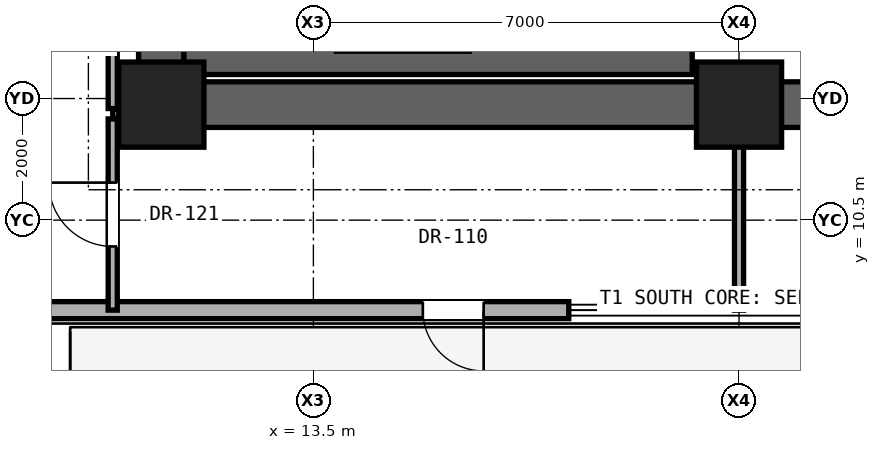
"""IFC4 building model, lengths in metres.
Left out: names, types, materials, properties, quantities, classifications, styles, units other than length and angle.
Written with IfcOpenShell. Run it as: python <this file> out.ifc"""

import sys

from ifc_helpers import new_model, si_unit, direction, frame, frame_2d, origin, origin_2d, place, context, subcontext, project, spatial, rectangle, extrude, element, fill, save


model = new_model("IFC4")
c1 = context("Model", 3, precision=1e-05, world=origin(), true_north=direction((0.0, 1.0)))
c2 = subcontext(c1, "Body", "Model", "MODEL_VIEW")
j1 = project(units=[si_unit("LENGTHUNIT", "METRE"), si_unit("PLANEANGLEUNIT", "RADIAN")], contexts=[c1])
p1 = place(None, origin())
s1 = spatial("IfcSite", under=j1, at=p1, CompositionType="ELEMENT")
p2 = place(p1, origin())
s2 = spatial("IfcBuilding", under=s1, at=p2, CompositionType="ELEMENT")
p3 = place(p2, frame((0.0, 0.0, 22.4)))
s3 = spatial("IfcBuildingStorey", under=s2, at=p3, CompositionType="ELEMENT", Elevation=22.4)
for number, where, z_axis, x_axis in (
    (1, (11.0, 12.4, 0.0), (0.0, 0.0, 1.0), (1.0, 0.0, 0.0)),
    (2, (20.5, 12.4, 0.0), (0.0, 0.0, 1.0), (1.0, 0.0, 0.0)),
):
    element("IfcColumn", number, at=place(p3, frame(where, z_axis=z_axis, x_axis=x_axis)), inside=s3, PredefinedType="COLUMN", context=c2, shape_type="SweptSolid", body=[
        extrude(rectangle(XDim=1.4, YDim=1.4, at=origin_2d()), origin(), (0.0, 0.0, 1.0), 3.3),
    ])
p4 = place(p3, frame((11.0, 12.4, 0.0), z_axis=(0.0, 0.0, 1.0), x_axis=(1.0, 0.0, 0.0)))
e3 = element("IfcWall", 3, at=p4, inside=s3, PredefinedType="SHEAR", context=c2, shape_type="SweptSolid", body=[
    extrude(rectangle(XDim=19.0, YDim=0.75, at=frame_2d((9.5, 0.0))), origin(), (0.0, 0.0, 1.0), 3.06),
])
p5 = place(p3, frame((11.0, 12.4, 0.0), z_axis=(0.0, 0.0, 1.0), x_axis=(0.0, 1.0, 0.0)))
e4 = element("IfcWall", 4, at=p5, inside=s3, PredefinedType="SHEAR", context=c2, shape_type="SweptSolid", body=[
    extrude(rectangle(XDim=6.0, YDim=0.75, at=frame_2d((3.0, 0.0))), origin(), (0.0, 0.0, 1.0), 3.06),
])
p6 = place(p3, frame((17.7, 9.02, 0.0), z_axis=(0.0, 0.0, 1.0), x_axis=(-1.0, 0.0, 0.0)))
e5 = element("IfcWall", 5, at=p6, inside=s3, PredefinedType="SOLIDWALL", context=c2, shape_type="SweptSolid", body=[
    extrude(rectangle(XDim=12.8, YDim=0.28, at=frame_2d((6.4, 0.0))), origin(), (0.0, 0.0, 1.0), 3.04),
])
p7 = place(p6, frame((1.4, 0.0, 0.0)))
e6 = element("IfcOpeningElement", 6, at=p7, cuts=e5, PredefinedType="OPENING", context=c2, shape_type="SweptSolid", body=[
    extrude(rectangle(XDim=1.0, YDim=2.15, at=frame_2d((0.5, 1.075))), frame((0.0, 0.15, 0.0), z_axis=(0.0, -1.0, 0.0), x_axis=(1.0, 0.0, 0.0)), (0.0, 0.0, 1.0), 0.3),
])
p8 = place(p3, frame((10.2, 12.25, 0.0), z_axis=(0.0, 0.0, 1.0), x_axis=(1.0, 0.0, 0.0)))
e7 = element("IfcWall", 7, at=p8, inside=s3, PredefinedType="PARTITIONING", context=c2, shape_type="SweptSolid", body=[
    extrude(rectangle(XDim=0.43, YDim=0.15, at=frame_2d((0.215, 0.0))), origin(), (0.0, 0.0, 1.0), 3.06),
])
p9 = place(p3, frame((11.37, 13.12, 0.0), z_axis=(0.0, 0.0, 1.0), x_axis=(1.0, 0.0, 0.0)))
e8 = element("IfcWall", 8, at=p9, inside=s3, PredefinedType="SHEAR", context=c2, shape_type="SweptSolid", body=[
    extrude(rectangle(XDim=8.36, YDim=0.45, at=frame_2d((4.18, 0.0))), origin(), (0.0, 0.0, 1.0), 3.06),
])
p10 = place(p3, frame((10.2, 9.02, 0.0), z_axis=(0.0, 0.0, 1.0), x_axis=(0.0, 1.0, 0.0)))
e9 = element("IfcWall", 9, at=p10, inside=s3, PredefinedType="PARTITIONING", context=c2, shape_type="SweptSolid", body=[
    extrude(rectangle(XDim=3.145, YDim=0.15, at=frame_2d((1.573, 0.0))), origin(), (0.0, 0.0, 1.0), 3.06),
])
p11 = place(p10, frame((1.048, 0.0, 0.0)))
e10 = element("IfcOpeningElement", 10, at=p11, cuts=e9, PredefinedType="OPENING", context=c2, shape_type="SweptSolid", body=[
    extrude(rectangle(XDim=1.05, YDim=2.2, at=frame_2d((0.525, 1.1))), frame((0.0, 0.085, 0.0), z_axis=(0.0, -1.0, 0.0), x_axis=(1.0, 0.0, 0.0)), (0.0, 0.0, 1.0), 0.17),
])
p12 = place(p3, frame((10.2, 12.335, 0.0), z_axis=(0.0, 0.0, 1.0), x_axis=(0.0, 1.0, 0.0)))
e11 = element("IfcWall", 11, at=p12, inside=s3, PredefinedType="PARTITIONING", context=c2, shape_type="SweptSolid", body=[
    extrude(rectangle(XDim=5.98, YDim=0.15, at=frame_2d((2.99, 0.0))), origin(), (0.0, 0.0, 1.0), 2.436),
])
p13 = place(p3, frame((20.5, 9.02, 0.0), z_axis=(0.0, 0.0, 1.0), x_axis=(0.0, 1.0, 0.0)))
e12 = element("IfcWall", 12, at=p13, inside=s3, PredefinedType="PARTITIONING", context=c2, shape_type="SweptSolid", body=[
    extrude(rectangle(XDim=3.01, YDim=0.15, at=frame_2d((1.505, 0.0))), origin(), (0.0, 0.0, 1.0), 3.06),
])
p14 = place(p7, origin())
e13 = element("IfcDoor", 13, at=p14, inside=s3, OperationType="SINGLE_SWING_LEFT", PredefinedType="DOOR", context=c2, shape_type="SweptSolid", body=[
    extrude(rectangle(XDim=1.0, YDim=2.15, at=frame_2d((0.5, 1.075))), frame((0.0, 0.025, 0.0), z_axis=(0.0, -1.0, 0.0), x_axis=(1.0, 0.0, 0.0)), (0.0, 0.0, 1.0), 0.05),
])
fill(e6, e13)
p15 = place(p11, origin())
e14 = element("IfcDoor", 14, at=p15, inside=s3, OperationType="SINGLE_SWING_RIGHT", PredefinedType="DOOR", context=c2, shape_type="SweptSolid", body=[
    extrude(rectangle(XDim=1.05, YDim=2.2, at=frame_2d((0.525, 1.1))), frame((0.0, 0.025, 0.0), z_axis=(0.0, -1.0, 0.0), x_axis=(1.0, 0.0, 0.0)), (0.0, 0.0, 1.0), 0.05),
])
fill(e10, e14)
save(model, sys.argv[1])
